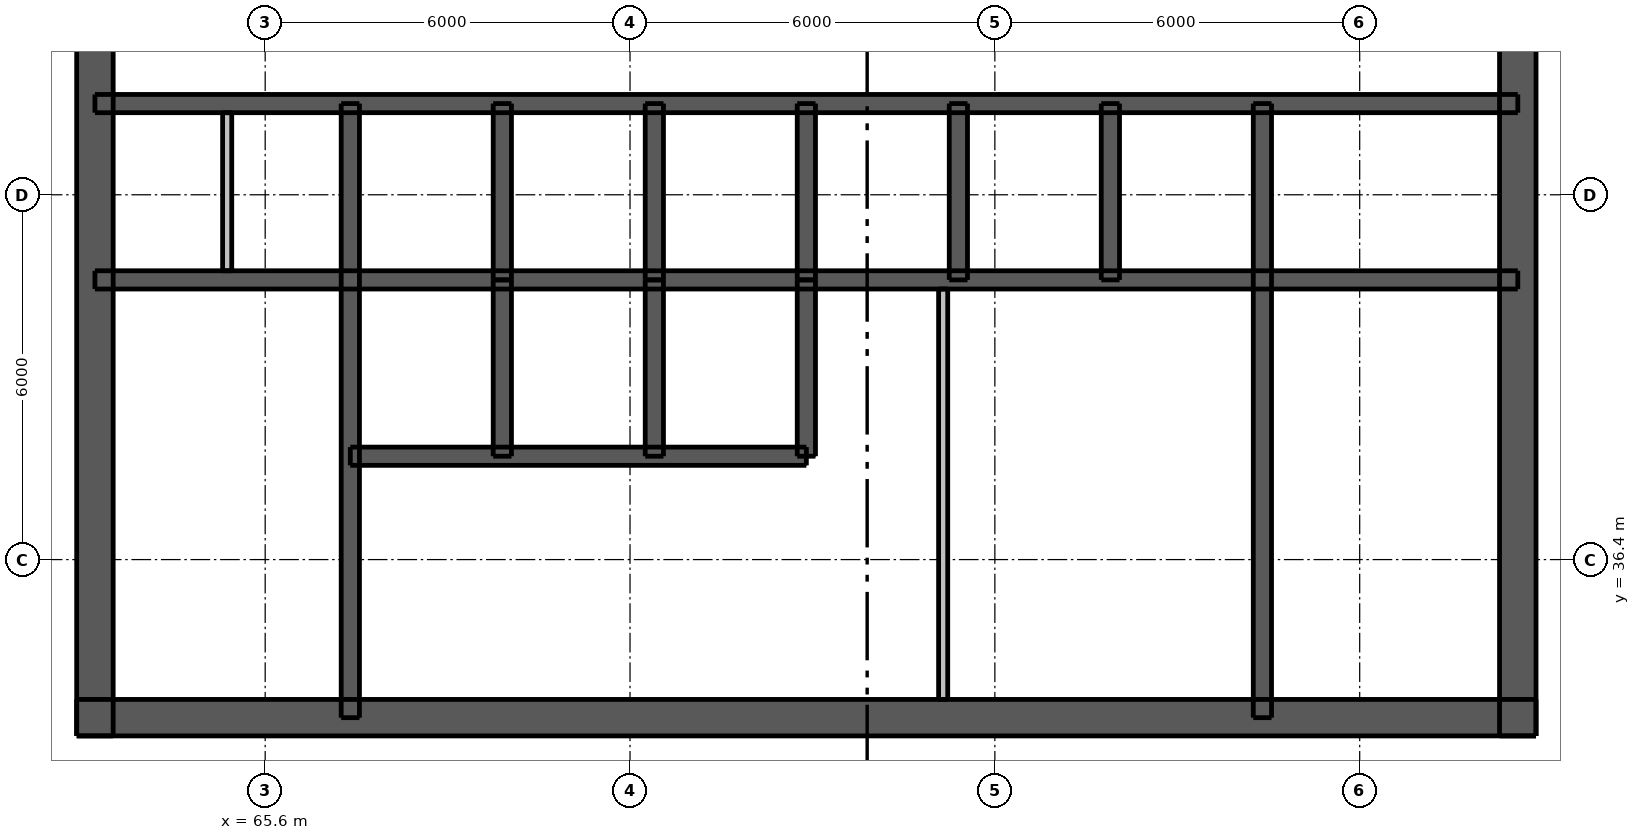
"""IFC4 building model, lengths in metres.
Left out: names, types, materials, properties, quantities, classifications, styles, units other than length and angle.
Written with IfcOpenShell. Run it as: python <this file> out.ifc"""

import sys

from ifc_helpers import new_model, si_unit, direction, frame, frame_2d, origin, place, context, subcontext, project, spatial, rectangle, extrude, element, fill, save


model = new_model("IFC4")
c1 = context("Model", 3, precision=1e-05, world=origin(), true_north=direction((0.0, 1.0)))
c2 = subcontext(c1, "Body", "Model", "MODEL_VIEW")
j1 = project(units=[si_unit("LENGTHUNIT", "METRE"), si_unit("PLANEANGLEUNIT", "RADIAN")], contexts=[c1])
p1 = place(None, origin())
s1 = spatial("IfcSite", under=j1, at=p1, CompositionType="ELEMENT")
p2 = place(p1, origin())
s2 = spatial("IfcBuilding", under=s1, at=p2, CompositionType="ELEMENT")
p3 = place(p2, frame((0.0, 0.0, 206.8)))
s3 = spatial("IfcBuildingStorey", under=s2, at=p3, CompositionType="ELEMENT", Elevation=206.8)
p4 = place(p3, frame((62.5, 33.8, 0.0), z_axis=(0.0, 0.0, 1.0), x_axis=(1.0, 0.0, 0.0)))
e1 = element("IfcWall", 1, at=p4, inside=s3, PredefinedType="SHEAR", context=c2, shape_type="SweptSolid", body=[
    extrude(rectangle(XDim=24.0, YDim=0.6, at=frame_2d((12.0, 0.0))), origin(), (0.0, 0.0, 1.0), 3.05),
])
p5 = place(p4, frame((1.925, 0.0, 0.0)))
e2 = element("IfcOpeningElement", 2, at=p5, cuts=e1, PredefinedType="OPENING", context=c2, shape_type="SweptSolid", body=[
    extrude(rectangle(XDim=1.1, YDim=2.1, at=frame_2d((0.55, 1.05))), frame((0.0, 0.31, 0.0), z_axis=(0.0, -1.0, 0.0), x_axis=(1.0, 0.0, 0.0)), (0.0, 0.0, 1.0), 0.62),
])
p6 = place(p4, frame((20.975, 0.0, 0.0)))
e3 = element("IfcOpeningElement", 3, at=p6, cuts=e1, PredefinedType="OPENING", context=c2, shape_type="SweptSolid", body=[
    extrude(rectangle(XDim=1.1, YDim=2.1, at=frame_2d((0.55, 1.05))), frame((0.0, 0.31, 0.0), z_axis=(0.0, -1.0, 0.0), x_axis=(1.0, 0.0, 0.0)), (0.0, 0.0, 1.0), 0.62),
])
p7 = place(p4, frame((8.0, 0.0, 0.0)))
e4 = element("IfcOpeningElement", 4, at=p7, cuts=e1, PredefinedType="OPENING", context=c2, shape_type="SweptSolid", body=[
    extrude(rectangle(XDim=1.1, YDim=2.1, at=frame_2d((0.55, 1.05))), frame((0.0, 0.31, 0.0), z_axis=(0.0, -1.0, 0.0), x_axis=(1.0, 0.0, 0.0)), (0.0, 0.0, 1.0), 0.62),
])
p8 = place(p4, frame((16.387, 0.0, 0.0)))
e5 = element("IfcOpeningElement", 5, at=p8, cuts=e1, PredefinedType="OPENING", context=c2, shape_type="SweptSolid", body=[
    extrude(rectangle(XDim=0.9, YDim=2.1, at=frame_2d((0.45, 1.05))), frame((0.0, 0.31, 0.0), z_axis=(0.0, -1.0, 0.0), x_axis=(1.0, 0.0, 0.0)), (0.0, 0.0, 1.0), 0.62),
])
p9 = place(p3, frame((62.8, 33.5, 0.0), z_axis=(0.0, 0.0, 1.0), x_axis=(0.0, 1.0, 0.0)))
e6 = element("IfcWall", 6, at=p9, inside=s3, PredefinedType="SHEAR", context=c2, shape_type="SweptSolid", body=[
    extrude(rectangle(XDim=24.0, YDim=0.6, at=frame_2d((12.0, 0.0))), origin(), (0.0, 0.0, 1.0), 3.05),
])
p10 = place(p9, frame((11.2, 0.0, 0.0)))
e7 = element("IfcOpeningElement", 7, at=p10, cuts=e6, PredefinedType="OPENING", context=c2, shape_type="SweptSolid", body=[
    extrude(rectangle(XDim=1.6, YDim=2.1, at=frame_2d((0.8, 1.05))), frame((0.0, 0.31, 0.0), z_axis=(0.0, -1.0, 0.0), x_axis=(1.0, 0.0, 0.0)), (0.0, 0.0, 1.0), 0.62),
])
p11 = place(p3, frame((86.2, 33.5, 0.0), z_axis=(0.0, 0.0, 1.0), x_axis=(0.0, 1.0, 0.0)))
e8 = element("IfcWall", 8, at=p11, inside=s3, PredefinedType="SHEAR", context=c2, shape_type="SweptSolid", body=[
    extrude(rectangle(XDim=24.0, YDim=0.6, at=frame_2d((12.0, 0.0))), origin(), (0.0, 0.0, 1.0), 3.05),
])
p12 = place(p11, frame((11.2, 0.0, 0.0)))
e9 = element("IfcOpeningElement", 9, at=p12, cuts=e8, PredefinedType="OPENING", context=c2, shape_type="SweptSolid", body=[
    extrude(rectangle(XDim=1.6, YDim=2.1, at=frame_2d((0.8, 1.05))), frame((0.0, 0.31, 0.0), z_axis=(0.0, -1.0, 0.0), x_axis=(1.0, 0.0, 0.0)), (0.0, 0.0, 1.0), 0.62),
])
p13 = place(p3, frame((62.8, 41.0, 0.0), z_axis=(0.0, 0.0, 1.0), x_axis=(1.0, 0.0, 0.0)))
e10 = element("IfcWall", 10, at=p13, inside=s3, PredefinedType="SHEAR", context=c2, shape_type="SweptSolid", body=[
    extrude(rectangle(XDim=23.4, YDim=0.3, at=frame_2d((11.7, 0.0))), origin(), (0.0, 0.0, 1.0), 3.05),
])
p14 = place(p3, frame((62.8, 43.9, 0.0), z_axis=(0.0, 0.0, 1.0), x_axis=(1.0, 0.0, 0.0)))
e11 = element("IfcWall", 11, at=p14, inside=s3, PredefinedType="SHEAR", context=c2, shape_type="SweptSolid", body=[
    extrude(rectangle(XDim=23.4, YDim=0.3, at=frame_2d((11.7, 0.0))), origin(), (0.0, 0.0, 1.0), 3.05),
])
p15 = place(p14, frame((0.788, 0.0, 0.0)))
e12 = element("IfcOpeningElement", 12, at=p15, cuts=e11, PredefinedType="OPENING", context=c2, shape_type="SweptSolid", body=[
    extrude(rectangle(XDim=0.9, YDim=2.1, at=frame_2d((0.45, 1.05))), frame((0.0, 0.16, 0.0), z_axis=(0.0, -1.0, 0.0), x_axis=(1.0, 0.0, 0.0)), (0.0, 0.0, 1.0), 0.32),
])
p16 = place(p14, frame((2.663, 0.0, 0.0)))
e13 = element("IfcOpeningElement", 13, at=p16, cuts=e11, PredefinedType="OPENING", context=c2, shape_type="SweptSolid", body=[
    extrude(rectangle(XDim=0.9, YDim=2.1, at=frame_2d((0.45, 1.05))), frame((0.0, 0.16, 0.0), z_axis=(0.0, -1.0, 0.0), x_axis=(1.0, 0.0, 0.0)), (0.0, 0.0, 1.0), 0.32),
])
p17 = place(p14, frame((20.775, 0.0, 0.0)))
e14 = element("IfcOpeningElement", 14, at=p17, cuts=e11, PredefinedType="OPENING", context=c2, shape_type="SweptSolid", body=[
    extrude(rectangle(XDim=0.9, YDim=2.1, at=frame_2d((0.45, 1.05))), frame((0.0, 0.16, 0.0), z_axis=(0.0, -1.0, 0.0), x_axis=(1.0, 0.0, 0.0)), (0.0, 0.0, 1.0), 0.32),
])
p18 = place(p14, frame((5.0, 0.0, 0.0)))
e15 = element("IfcOpeningElement", 15, at=p18, cuts=e11, PredefinedType="OPENING", context=c2, shape_type="SweptSolid", body=[
    extrude(rectangle(XDim=0.9, YDim=2.1, at=frame_2d((0.45, 1.05))), frame((0.0, 0.16, 0.0), z_axis=(0.0, -1.0, 0.0), x_axis=(1.0, 0.0, 0.0)), (0.0, 0.0, 1.0), 0.32),
])
p19 = place(p14, frame((10.0, 0.0, 0.0)))
e16 = element("IfcOpeningElement", 16, at=p19, cuts=e11, PredefinedType="OPENING", context=c2, shape_type="SweptSolid", body=[
    extrude(rectangle(XDim=0.9, YDim=2.1, at=frame_2d((0.45, 1.05))), frame((0.0, 0.16, 0.0), z_axis=(0.0, -1.0, 0.0), x_axis=(1.0, 0.0, 0.0)), (0.0, 0.0, 1.0), 0.32),
])
p20 = place(p14, frame((12.5, 0.0, 0.0)))
e17 = element("IfcOpeningElement", 17, at=p20, cuts=e11, PredefinedType="OPENING", context=c2, shape_type="SweptSolid", body=[
    extrude(rectangle(XDim=0.9, YDim=2.1, at=frame_2d((0.45, 1.05))), frame((0.0, 0.16, 0.0), z_axis=(0.0, -1.0, 0.0), x_axis=(1.0, 0.0, 0.0)), (0.0, 0.0, 1.0), 0.32),
])
p21 = place(p14, frame((17.5, 0.0, 0.0)))
e18 = element("IfcOpeningElement", 18, at=p21, cuts=e11, PredefinedType="OPENING", context=c2, shape_type="SweptSolid", body=[
    extrude(rectangle(XDim=0.9, YDim=2.1, at=frame_2d((0.45, 1.05))), frame((0.0, 0.16, 0.0), z_axis=(0.0, -1.0, 0.0), x_axis=(1.0, 0.0, 0.0)), (0.0, 0.0, 1.0), 0.32),
])
p22 = place(p3, frame((67.0, 33.8, 0.0), z_axis=(0.0, 0.0, 1.0), x_axis=(0.0, 1.0, 0.0)))
e19 = element("IfcWall", 19, at=p22, inside=s3, PredefinedType="SHEAR", context=c2, shape_type="SweptSolid", body=[
    extrude(rectangle(XDim=10.1, YDim=0.3, at=frame_2d((5.05, 0.0))), origin(), (0.0, 0.0, 1.0), 3.05),
])
p23 = place(p22, frame((0.5, 0.0, 0.0)))
e20 = element("IfcOpeningElement", 20, at=p23, cuts=e19, PredefinedType="OPENING", context=c2, shape_type="SweptSolid", body=[
    extrude(rectangle(XDim=1.1, YDim=2.1, at=frame_2d((0.55, 1.05))), frame((0.0, 0.16, 0.0), z_axis=(0.0, -1.0, 0.0), x_axis=(1.0, 0.0, 0.0)), (0.0, 0.0, 1.0), 0.32),
])
p24 = place(p3, frame((82.0, 33.8, 0.0), z_axis=(0.0, 0.0, 1.0), x_axis=(0.0, 1.0, 0.0)))
e21 = element("IfcWall", 21, at=p24, inside=s3, PredefinedType="SHEAR", context=c2, shape_type="SweptSolid", body=[
    extrude(rectangle(XDim=10.1, YDim=0.3, at=frame_2d((5.05, 0.0))), origin(), (0.0, 0.0, 1.0), 3.05),
])
for number, where, z_axis, x_axis in (
    (22, (69.5, 41.0, 0.0), (0.0, 0.0, 1.0), (0.0, 1.0, 0.0)),
    (23, (72.0, 41.0, 0.0), (0.0, 0.0, 1.0), (0.0, 1.0, 0.0)),
    (24, (74.5, 41.0, 0.0), (0.0, 0.0, 1.0), (0.0, 1.0, 0.0)),
    (25, (77.0, 41.0, 0.0), (0.0, 0.0, 1.0), (0.0, 1.0, 0.0)),
    (26, (79.5, 41.0, 0.0), (0.0, 0.0, 1.0), (0.0, 1.0, 0.0)),
):
    element("IfcWall", number, at=place(p3, frame(where, z_axis=z_axis, x_axis=x_axis)), inside=s3, PredefinedType="SHEAR", context=c2, shape_type="SweptSolid", body=[
        extrude(rectangle(XDim=2.9, YDim=0.3, at=frame_2d((1.45, 0.0))), origin(), (0.0, 0.0, 1.0), 3.05),
    ])
p25 = place(p3, frame((67.0, 38.1, 0.0), z_axis=(0.0, 0.0, 1.0), x_axis=(1.0, 0.0, 0.0)))
e27 = element("IfcWall", 27, at=p25, inside=s3, PredefinedType="SHEAR", context=c2, shape_type="SweptSolid", body=[
    extrude(rectangle(XDim=7.5, YDim=0.3, at=frame_2d((3.75, 0.0))), origin(), (0.0, 0.0, 1.0), 3.05),
])
p26 = place(p25, frame((0.7, 0.0, 0.0)))
e28 = element("IfcOpeningElement", 28, at=p26, cuts=e27, PredefinedType="OPENING", context=c2, shape_type="SweptSolid", body=[
    extrude(rectangle(XDim=1.1, YDim=2.1, at=frame_2d((0.55, 1.05))), frame((0.0, 0.16, 0.0), z_axis=(0.0, -1.0, 0.0), x_axis=(1.0, 0.0, 0.0)), (0.0, 0.0, 1.0), 0.32),
])
p27 = place(p25, frame((3.2, 0.0, 0.0)))
e29 = element("IfcOpeningElement", 29, at=p27, cuts=e27, PredefinedType="OPENING", context=c2, shape_type="SweptSolid", body=[
    extrude(rectangle(XDim=1.1, YDim=2.1, at=frame_2d((0.55, 1.05))), frame((0.0, 0.16, 0.0), z_axis=(0.0, -1.0, 0.0), x_axis=(1.0, 0.0, 0.0)), (0.0, 0.0, 1.0), 0.32),
])
p28 = place(p25, frame((5.65, 0.0, 0.0)))
e30 = element("IfcOpeningElement", 30, at=p28, cuts=e27, PredefinedType="OPENING", context=c2, shape_type="SweptSolid", body=[
    extrude(rectangle(XDim=1.2, YDim=2.1, at=frame_2d((0.6, 1.05))), frame((0.0, 0.16, 0.0), z_axis=(0.0, -1.0, 0.0), x_axis=(1.0, 0.0, 0.0)), (0.0, 0.0, 1.0), 0.32),
])
for number, where, z_axis, x_axis in (
    (31, (69.5, 38.1, 0.0), (0.0, 0.0, 1.0), (0.0, 1.0, 0.0)),
    (32, (72.0, 38.1, 0.0), (0.0, 0.0, 1.0), (0.0, 1.0, 0.0)),
    (33, (74.5, 38.1, 0.0), (0.0, 0.0, 1.0), (0.0, 1.0, 0.0)),
):
    element("IfcWall", number, at=place(p3, frame(where, z_axis=z_axis, x_axis=x_axis)), inside=s3, PredefinedType="SHEAR", context=c2, shape_type="SweptSolid", body=[
        extrude(rectangle(XDim=2.9, YDim=0.3, at=frame_2d((1.45, 0.0))), origin(), (0.0, 0.0, 1.0), 3.05),
    ])
p29 = place(p3, frame((76.75, 34.1, 0.0), z_axis=(0.0, 0.0, 1.0), x_axis=(0.0, 1.0, 0.0)))
e34 = element("IfcWall", 34, at=p29, inside=s3, PredefinedType="PLUMBINGWALL", context=c2, shape_type="SweptSolid", body=[
    extrude(rectangle(XDim=6.75, YDim=0.15, at=frame_2d((3.375, 0.0))), origin(), (0.0, 0.0, 1.0), 3.05),
])
p30 = place(p3, frame((64.975, 41.15, 0.0), z_axis=(0.0, 0.0, 1.0), x_axis=(0.0, 1.0, 0.0)))
e35 = element("IfcWall", 35, at=p30, inside=s3, PredefinedType="PLUMBINGWALL", context=c2, shape_type="SweptSolid", body=[
    extrude(rectangle(XDim=2.6, YDim=0.15, at=frame_2d((1.3, 0.0))), origin(), (0.0, 0.0, 1.0), 3.05),
])
p31 = place(p5, origin())
e36 = element("IfcDoor", 36, at=p31, inside=s3, OperationType="SINGLE_SWING_LEFT", PredefinedType="DOOR", context=c2, shape_type="SweptSolid", body=[
    extrude(rectangle(XDim=1.1, YDim=2.1, at=frame_2d((0.55, 1.05))), frame((0.0, 0.288, 0.0), z_axis=(0.0, -1.0, 0.0), x_axis=(1.0, 0.0, 0.0)), (0.0, 0.0, 1.0), 0.05),
])
fill(e2, e36)
p32 = place(p6, origin())
e37 = element("IfcDoor", 37, at=p32, inside=s3, OperationType="SINGLE_SWING_RIGHT", PredefinedType="DOOR", context=c2, shape_type="SweptSolid", body=[
    extrude(rectangle(XDim=1.1, YDim=2.1, at=frame_2d((0.55, 1.05))), frame((0.0, 0.288, 0.0), z_axis=(0.0, -1.0, 0.0), x_axis=(1.0, 0.0, 0.0)), (0.0, 0.0, 1.0), 0.05),
])
fill(e3, e37)
p33 = place(p10, origin())
e38 = element("IfcDoor", 38, at=p33, inside=s3, OperationType="DOUBLE_DOOR_SINGLE_SWING", PredefinedType="DOOR", context=c2, shape_type="SweptSolid", body=[
    extrude(rectangle(XDim=1.6, YDim=2.1, at=frame_2d((0.8, 1.05))), frame((0.0, -0.237, 0.0), z_axis=(0.0, -1.0, 0.0), x_axis=(1.0, 0.0, 0.0)), (0.0, 0.0, 1.0), 0.05),
])
fill(e7, e38)
p34 = place(p12, origin())
e39 = element("IfcDoor", 39, at=p34, inside=s3, OperationType="DOUBLE_DOOR_SINGLE_SWING", PredefinedType="DOOR", context=c2, shape_type="SweptSolid", body=[
    extrude(rectangle(XDim=1.6, YDim=2.1, at=frame_2d((0.8, 1.05))), frame((0.0, 0.288, 0.0), z_axis=(0.0, -1.0, 0.0), x_axis=(1.0, 0.0, 0.0)), (0.0, 0.0, 1.0), 0.05),
])
fill(e9, e39)
p35 = place(p7, origin())
e40 = element("IfcDoor", 40, at=p35, inside=s3, OperationType="SINGLE_SWING_LEFT", PredefinedType="DOOR", context=c2, shape_type="SweptSolid", body=[
    extrude(rectangle(XDim=1.1, YDim=2.1, at=frame_2d((0.55, 1.05))), frame((0.0, 0.288, 0.0), z_axis=(0.0, -1.0, 0.0), x_axis=(1.0, 0.0, 0.0)), (0.0, 0.0, 1.0), 0.05),
])
fill(e4, e40)
p36 = place(p23, origin())
e41 = element("IfcDoor", 41, at=p36, inside=s3, OperationType="SINGLE_SWING_RIGHT", PredefinedType="DOOR", context=c2, shape_type="SweptSolid", body=[
    extrude(rectangle(XDim=1.1, YDim=2.1, at=frame_2d((0.55, 1.05))), frame((0.0, -0.087, 0.0), z_axis=(0.0, -1.0, 0.0), x_axis=(1.0, 0.0, 0.0)), (0.0, 0.0, 1.0), 0.05),
])
fill(e20, e41)
p37 = place(p8, origin())
e42 = element("IfcDoor", 42, at=p37, inside=s3, OperationType="SINGLE_SWING_LEFT", PredefinedType="DOOR", context=c2, shape_type="SweptSolid", body=[
    extrude(rectangle(XDim=0.9, YDim=2.1, at=frame_2d((0.45, 1.05))), frame((0.0, 0.288, 0.0), z_axis=(0.0, -1.0, 0.0), x_axis=(1.0, 0.0, 0.0)), (0.0, 0.0, 1.0), 0.05),
])
fill(e5, e42)
p38 = place(p15, origin())
e43 = element("IfcDoor", 43, at=p38, inside=s3, OperationType="SINGLE_SWING_LEFT", PredefinedType="DOOR", context=c2, shape_type="SweptSolid", body=[
    extrude(rectangle(XDim=0.9, YDim=2.1, at=frame_2d((0.45, 1.05))), frame((0.0, -0.087, 0.0), z_axis=(0.0, -1.0, 0.0), x_axis=(1.0, 0.0, 0.0)), (0.0, 0.0, 1.0), 0.05),
])
fill(e12, e43)
p39 = place(p16, origin())
e44 = element("IfcDoor", 44, at=p39, inside=s3, OperationType="SINGLE_SWING_RIGHT", PredefinedType="DOOR", context=c2, shape_type="SweptSolid", body=[
    extrude(rectangle(XDim=0.9, YDim=2.1, at=frame_2d((0.45, 1.05))), frame((0.0, -0.087, 0.0), z_axis=(0.0, -1.0, 0.0), x_axis=(1.0, 0.0, 0.0)), (0.0, 0.0, 1.0), 0.05),
])
fill(e13, e44)
p40 = place(p17, origin())
e45 = element("IfcDoor", 45, at=p40, inside=s3, OperationType="SINGLE_SWING_LEFT", PredefinedType="DOOR", context=c2, shape_type="SweptSolid", body=[
    extrude(rectangle(XDim=0.9, YDim=2.1, at=frame_2d((0.45, 1.05))), frame((0.0, -0.087, 0.0), z_axis=(0.0, -1.0, 0.0), x_axis=(1.0, 0.0, 0.0)), (0.0, 0.0, 1.0), 0.05),
])
fill(e14, e45)
p41 = place(p18, origin())
e46 = element("IfcDoor", 46, at=p41, inside=s3, OperationType="SINGLE_SWING_RIGHT", PredefinedType="DOOR", context=c2, shape_type="SweptSolid", body=[
    extrude(rectangle(XDim=0.9, YDim=2.1, at=frame_2d((0.45, 1.05))), frame((0.0, -0.087, 0.0), z_axis=(0.0, -1.0, 0.0), x_axis=(1.0, 0.0, 0.0)), (0.0, 0.0, 1.0), 0.05),
])
fill(e15, e46)
p42 = place(p19, origin())
e47 = element("IfcDoor", 47, at=p42, inside=s3, OperationType="SINGLE_SWING_RIGHT", PredefinedType="DOOR", context=c2, shape_type="SweptSolid", body=[
    extrude(rectangle(XDim=0.9, YDim=2.1, at=frame_2d((0.45, 1.05))), frame((0.0, -0.087, 0.0), z_axis=(0.0, -1.0, 0.0), x_axis=(1.0, 0.0, 0.0)), (0.0, 0.0, 1.0), 0.05),
])
fill(e16, e47)
p43 = place(p20, origin())
e48 = element("IfcDoor", 48, at=p43, inside=s3, OperationType="SINGLE_SWING_LEFT", PredefinedType="DOOR", context=c2, shape_type="SweptSolid", body=[
    extrude(rectangle(XDim=0.9, YDim=2.1, at=frame_2d((0.45, 1.05))), frame((0.0, -0.087, 0.0), z_axis=(0.0, -1.0, 0.0), x_axis=(1.0, 0.0, 0.0)), (0.0, 0.0, 1.0), 0.05),
])
fill(e17, e48)
p44 = place(p21, origin())
e49 = element("IfcDoor", 49, at=p44, inside=s3, OperationType="SINGLE_SWING_LEFT", PredefinedType="DOOR", context=c2, shape_type="SweptSolid", body=[
    extrude(rectangle(XDim=0.9, YDim=2.1, at=frame_2d((0.45, 1.05))), frame((0.0, -0.087, 0.0), z_axis=(0.0, -1.0, 0.0), x_axis=(1.0, 0.0, 0.0)), (0.0, 0.0, 1.0), 0.05),
])
fill(e18, e49)
p45 = place(p26, origin())
e50 = element("IfcDoor", 50, at=p45, inside=s3, OperationType="DOUBLE_DOOR_SLIDING", PredefinedType="DOOR", context=c2, shape_type="SweptSolid", body=[
    extrude(rectangle(XDim=1.1, YDim=2.1, at=frame_2d((0.55, 1.05))), frame((0.0, 0.025, 0.0), z_axis=(0.0, -1.0, 0.0), x_axis=(1.0, 0.0, 0.0)), (0.0, 0.0, 1.0), 0.05),
])
fill(e28, e50)
p46 = place(p27, origin())
e51 = element("IfcDoor", 51, at=p46, inside=s3, OperationType="DOUBLE_DOOR_SLIDING", PredefinedType="DOOR", context=c2, shape_type="SweptSolid", body=[
    extrude(rectangle(XDim=1.1, YDim=2.1, at=frame_2d((0.55, 1.05))), frame((0.0, 0.025, 0.0), z_axis=(0.0, -1.0, 0.0), x_axis=(1.0, 0.0, 0.0)), (0.0, 0.0, 1.0), 0.05),
])
fill(e29, e51)
p47 = place(p28, origin())
e52 = element("IfcDoor", 52, at=p47, inside=s3, OperationType="DOUBLE_DOOR_SLIDING", PredefinedType="DOOR", context=c2, shape_type="SweptSolid", body=[
    extrude(rectangle(XDim=1.2, YDim=2.1, at=frame_2d((0.6, 1.05))), frame((0.0, 0.025, 0.0), z_axis=(0.0, -1.0, 0.0), x_axis=(1.0, 0.0, 0.0)), (0.0, 0.0, 1.0), 0.05),
])
fill(e30, e52)
save(model, sys.argv[1])
